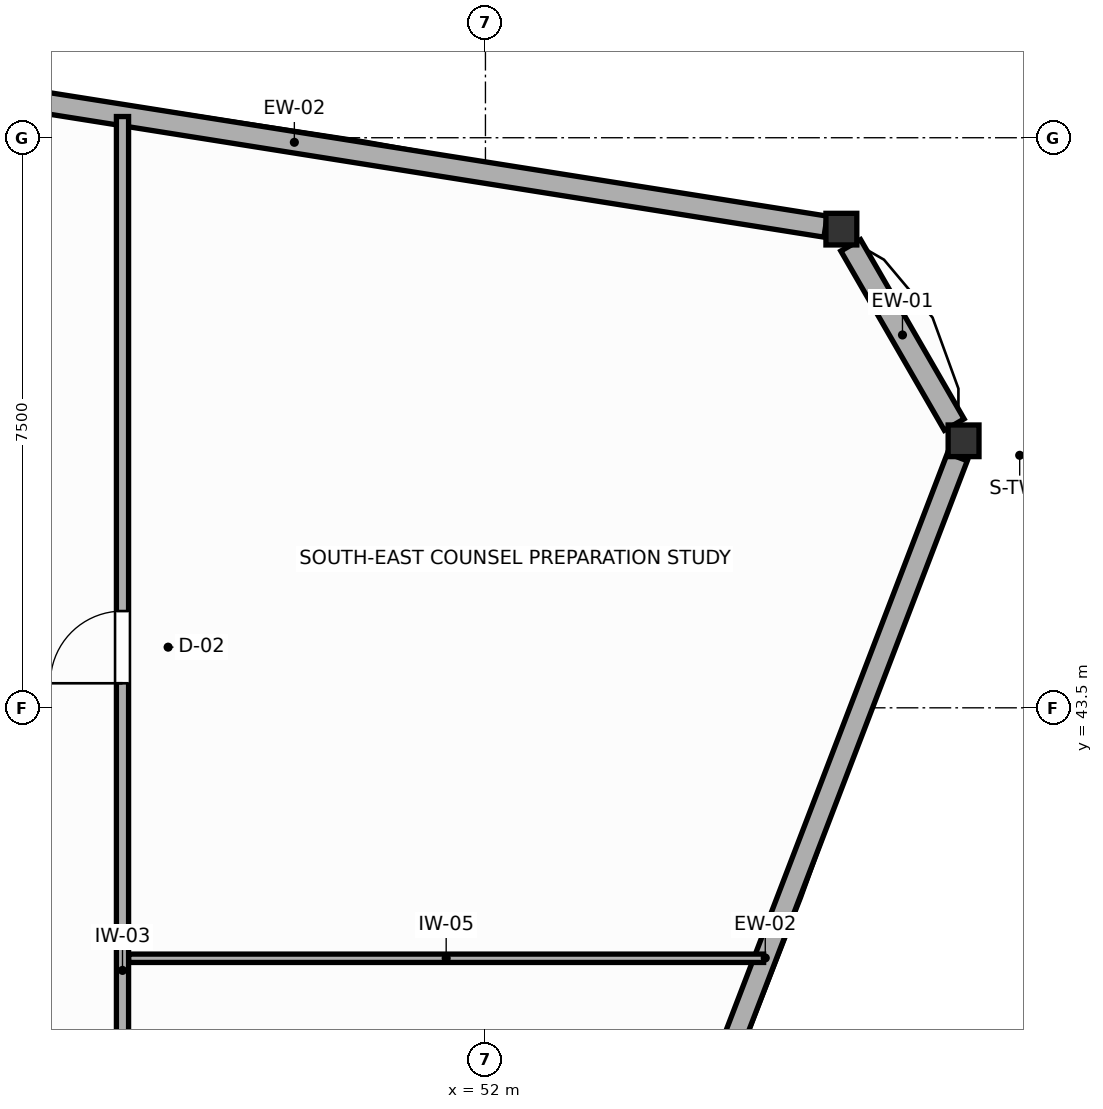
"""IFC4 building model, lengths in metres.
Left out: names, types, materials, properties, quantities, classifications, styles, units other than length and angle.
Written with IfcOpenShell. Run it as: python <this file> out.ifc"""

import sys

from ifc_helpers import new_model, si_unit, direction, frame, frame_2d, origin, origin_2d, place, context, subcontext, project, spatial, rectangle, i_section, extrude, source, transform, mapped, element, fill, save


model = new_model("IFC4")
c1 = context("Model", 3, precision=1e-05, world=origin(), true_north=direction((0.0, 1.0)))
c2 = subcontext(c1, "Body", "Model", "MODEL_VIEW")
j1 = project(units=[si_unit("LENGTHUNIT", "METRE"), si_unit("PLANEANGLEUNIT", "RADIAN")], contexts=[c1])
p1 = place(None, origin())
s1 = spatial("IfcSite", under=j1, at=p1, CompositionType="ELEMENT")
p2 = place(p1, origin())
s2 = spatial("IfcBuilding", under=s1, at=p2, CompositionType="ELEMENT")
p3 = place(p2, frame((0.0, 0.0, 179.4)))
s3 = spatial("IfcBuildingStorey", under=s2, at=p3, CompositionType="ELEMENT", Elevation=179.4)
m1 = source(origin(), c2, "Body", "SweptSolid", [
    extrude(i_section(OverallWidth=0.406, OverallDepth=0.416, WebThickness=0.027, FlangeThickness=0.044, FilletRadius=0.015, at=origin_2d()), origin(), (0.0, 0.0, 1.0), 3.6),
])
for number, where, z_axis, x_axis in (
    (1, (58.29, 47.013, 0.0), (0.0, 0.0, 1.0), (1.0, 0.0, 0.0)),
    (2, (56.683, 49.798, 0.0), (0.0, 0.0, 1.0), (1.0, 0.0, 0.0)),
):
    element("IfcColumn", number, at=place(p3, frame(where, z_axis=z_axis, x_axis=x_axis)), inside=s3, PredefinedType="COLUMN", context=c2, shape_type="MappedRepresentation", body=[
        mapped(m1, transform((0.0, 0.0, 0.0), scale=1.0)),
    ])
p4 = place(p3, frame((58.167, 47.226, 0.0), z_axis=(0.0, 0.0, 1.0), x_axis=(-0.499947493121, 0.866055716523, 0.0)))
e3 = element("IfcWall", 3, at=p4, inside=s3, PredefinedType="SOLIDWALL", context=c2, shape_type="SweptSolid", body=[
    extrude(rectangle(XDim=2.723, YDim=0.3, at=frame_2d((1.362, 0.0))), origin(), (0.0, 0.0, 1.0), 1.87),
])
p5 = place(p3, frame((56.475, 49.831, 0.0), z_axis=(0.0, 0.0, 1.0), x_axis=(-0.987634086957, 0.156776625426, 0.0)))
e4 = element("IfcWall", 4, at=p5, inside=s3, PredefinedType="SOLIDWALL", context=c2, shape_type="SweptSolid", body=[
    extrude(rectangle(XDim=14.152, YDim=0.28, at=frame_2d((7.076, 0.0))), origin(), (0.0, 0.0, 1.0), 1.87),
])
p6 = place(p3, frame((53.154, 33.618, 0.0), z_axis=(0.0, 0.0, 1.0), x_axis=(0.358033263681, 0.933708831541, 0.0)))
e5 = element("IfcWall", 5, at=p6, inside=s3, PredefinedType="SOLIDWALL", context=c2, shape_type="SweptSolid", body=[
    extrude(rectangle(XDim=14.117, YDim=0.28, at=frame_2d((7.059, 0.0))), origin(), (0.0, 0.0, 1.0), 1.87),
])
p7 = place(p3, frame((47.225, 32.31, 0.0), z_axis=(0.0, 0.0, 1.0), x_axis=(0.0, 1.0, 0.0)))
e6 = element("IfcWall", 6, at=p7, inside=s3, PredefinedType="PARTITIONING", context=c2, shape_type="SweptSolid", body=[
    extrude(rectangle(XDim=18.969, YDim=0.16, at=frame_2d((9.484, 0.0))), origin(), (0.0, 0.0, 1.0), 3.4),
])
p8 = place(p7, frame((3.008, 0.0, 0.0)))
e7 = element("IfcOpeningElement", 7, at=p8, cuts=e6, PredefinedType="OPENING", context=c2, shape_type="SweptSolid", body=[
    extrude(rectangle(XDim=0.95, YDim=2.05, at=frame_2d((0.475, 1.025))), frame((0.0, 0.09, 0.0), z_axis=(0.0, -1.0, 0.0), x_axis=(1.0, 0.0, 0.0)), (0.0, 0.0, 1.0), 0.18),
])
p9 = place(p7, frame((11.513, 0.0, 0.0)))
e8 = element("IfcOpeningElement", 8, at=p9, cuts=e6, PredefinedType="OPENING", context=c2, shape_type="SweptSolid", body=[
    extrude(rectangle(XDim=0.95, YDim=2.05, at=frame_2d((0.475, 1.025))), frame((0.0, 0.09, 0.0), z_axis=(0.0, -1.0, 0.0), x_axis=(1.0, 0.0, 0.0)), (0.0, 0.0, 1.0), 0.18),
])
p10 = place(p3, frame((47.307, 40.205, 0.0), z_axis=(0.0, 0.0, 1.0), x_axis=(1.0, 0.0, 0.0)))
e9 = element("IfcWall", 9, at=p10, inside=s3, PredefinedType="MOVABLE", context=c2, shape_type="SweptSolid", body=[
    extrude(rectangle(XDim=8.353, YDim=0.11, at=frame_2d((4.176, 0.0))), origin(), (0.0, 0.0, 1.0), 3.4),
])
p11 = place(p9, origin())
e10 = element("IfcDoor", 10, at=p11, inside=s3, OperationType="SINGLE_SWING_LEFT", PredefinedType="DOOR", context=c2, shape_type="SweptSolid", body=[
    extrude(rectangle(XDim=0.95, YDim=2.05, at=frame_2d((0.475, 1.025))), frame((0.0, 0.025, 0.0), z_axis=(0.0, -1.0, 0.0), x_axis=(1.0, 0.0, 0.0)), (0.0, 0.0, 1.0), 0.05),
])
fill(e8, e10)
save(model, sys.argv[1])
